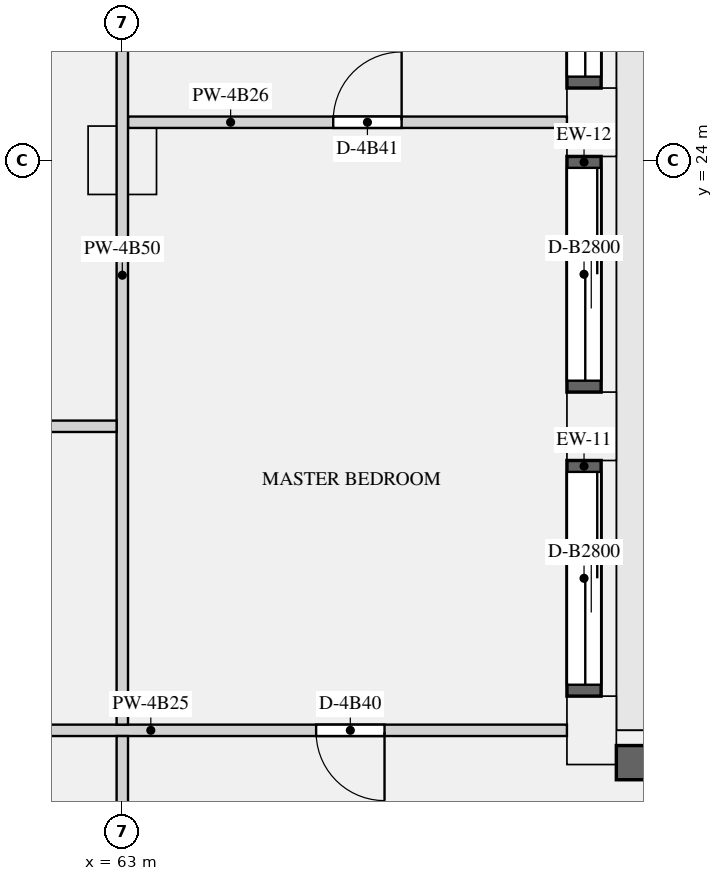
"""IFC4 building model, lengths in metres.
Left out: names, types, materials, properties, quantities, classifications, styles, units other than length and angle.
Written with IfcOpenShell. Run it as: python <this file> out.ifc"""

import sys

from ifc_helpers import new_model, si_unit, direction, frame, frame_2d, origin, origin_2d, place, context, subcontext, project, spatial, rectangle, extrude, element, fill, save


model = new_model("IFC4")
c1 = context("Model", 3, precision=1e-05, world=origin(), true_north=direction((0.0, 1.0)))
c2 = subcontext(c1, "Body", "Model", "MODEL_VIEW")
j1 = project(units=[si_unit("LENGTHUNIT", "METRE"), si_unit("PLANEANGLEUNIT", "RADIAN")], contexts=[c1])
p1 = place(None, origin())
s1 = spatial("IfcSite", under=j1, at=p1, CompositionType="ELEMENT")
p2 = place(p1, origin())
s2 = spatial("IfcBuilding", under=s1, at=p2, CompositionType="ELEMENT")
p3 = place(p2, frame((0.0, 0.0, 207.45)))
s3 = spatial("IfcBuildingStorey", under=s2, at=p3, CompositionType="ELEMENT", Elevation=207.45)
for number, where, z_axis, x_axis in (
    (1, (69.175, 16.5, 0.0), (0.0, 0.0, 1.0), (0.0, 1.0, 0.0)),
    (2, (69.175, 20.5, 0.0), (0.0, 0.0, 1.0), (0.0, 1.0, 0.0)),
    (3, (69.175, 24.5, 0.0), (0.0, 0.0, 1.0), (0.0, 1.0, 0.0)),
):
    element("IfcColumn", number, at=place(p3, frame(where, z_axis=z_axis, x_axis=x_axis)), inside=s3, PredefinedType="USERDEFINED", context=c2, shape_type="SweptSolid", body=[
        extrude(rectangle(XDim=0.9, YDim=0.65, at=origin_2d()), origin(), (0.0, 0.0, 1.0), 3.15),
    ])
p4 = place(p3, frame((63.0, 24.0, 0.0), z_axis=(0.0, 0.0, 1.0), x_axis=(1.0, 0.0, 0.0)))
e4 = element("IfcColumn", 4, at=p4, inside=s3, PredefinedType="COLUMN", context=c2, shape_type="SweptSolid", body=[
    extrude(rectangle(XDim=0.9, YDim=0.9, at=origin_2d()), origin(), (0.0, 0.0, 1.0), 3.15),
])
p5 = place(p3, frame((71.1, 16.075, 0.9), z_axis=(0.0, 0.0, 1.0), x_axis=(-1.0, 0.0, 0.0)))
e5 = element("IfcWall", 5, at=p5, inside=s3, PredefinedType="SOLIDWALL", context=c2, shape_type="SweptSolid", body=[
    extrude(rectangle(XDim=1.6, YDim=0.45, at=frame_2d((0.8, 0.0))), origin(), (0.0, 0.0, 1.0), 1.93),
])
p6 = place(p3, frame((69.075, 16.95, 0.0), z_axis=(0.0, 0.0, 1.0), x_axis=(0.0, 1.0, 0.0)))
e6 = element("IfcWall", 6, at=p6, inside=s3, PredefinedType="SOLIDWALL", context=c2, shape_type="SweptSolid", body=[
    extrude(rectangle(XDim=3.1, YDim=0.45, at=frame_2d((1.55, 0.0))), origin(), (0.0, 0.0, 1.0), 2.83),
])
p7 = place(p6, frame((0.15, 0.0, 0.0)))
e7 = element("IfcOpeningElement", 7, at=p7, cuts=e6, PredefinedType="OPENING", context=c2, shape_type="SweptSolid", body=[
    extrude(rectangle(XDim=2.8, YDim=2.3, at=frame_2d((1.4, 1.15))), frame((0.0, 0.235, 0.0), z_axis=(0.0, -1.0, 0.0), x_axis=(1.0, 0.0, 0.0)), (0.0, 0.0, 1.0), 0.47),
])
p8 = place(p3, frame((69.075, 20.95, 0.0), z_axis=(0.0, 0.0, 1.0), x_axis=(0.0, 1.0, 0.0)))
e8 = element("IfcWall", 8, at=p8, inside=s3, PredefinedType="SOLIDWALL", context=c2, shape_type="SweptSolid", body=[
    extrude(rectangle(XDim=3.1, YDim=0.45, at=frame_2d((1.55, 0.0))), origin(), (0.0, 0.0, 1.0), 2.83),
])
p9 = place(p8, frame((0.15, 0.0, 0.0)))
e9 = element("IfcOpeningElement", 9, at=p9, cuts=e8, PredefinedType="OPENING", context=c2, shape_type="SweptSolid", body=[
    extrude(rectangle(XDim=2.8, YDim=2.3, at=frame_2d((1.4, 1.15))), frame((0.0, 0.235, 0.0), z_axis=(0.0, -1.0, 0.0), x_axis=(1.0, 0.0, 0.0)), (0.0, 0.0, 1.0), 0.47),
])
p10 = place(p3, frame((69.075, 24.95, 0.0), z_axis=(0.0, 0.0, 1.0), x_axis=(0.0, 1.0, 0.0)))
e10 = element("IfcWall", 10, at=p10, inside=s3, PredefinedType="SOLIDWALL", context=c2, shape_type="SweptSolid", body=[
    extrude(rectangle(XDim=3.55, YDim=0.45, at=frame_2d((1.775, 0.0))), origin(), (0.0, 0.0, 1.0), 2.83),
])
p11 = place(p10, frame((0.15, 0.0, 0.0)))
e11 = element("IfcOpeningElement", 11, at=p11, cuts=e10, PredefinedType="OPENING", context=c2, shape_type="SweptSolid", body=[
    extrude(rectangle(XDim=3.25, YDim=2.3, at=frame_2d((1.625, 1.15))), frame((0.0, 0.235, 0.0), z_axis=(0.0, -1.0, 0.0), x_axis=(1.0, 0.0, 0.0)), (0.0, 0.0, 1.0), 0.47),
])
p12 = place(p3, frame((58.575, 20.5, 0.0), z_axis=(0.0, 0.0, 1.0), x_axis=(1.0, 0.0, 0.0)))
e12 = element("IfcWall", 12, at=p12, inside=s3, PredefinedType="PARTITIONING", context=c2, shape_type="SweptSolid", body=[
    extrude(rectangle(XDim=4.35, YDim=0.15, at=frame_2d((2.175, 0.0))), origin(), (0.0, 0.0, 1.0), 2.83),
])
p13 = place(p3, frame((54.1, 16.5, 0.0), z_axis=(0.0, 0.0, 1.0), x_axis=(1.0, 0.0, 0.0)))
e13 = element("IfcWall", 13, at=p13, inside=s3, PredefinedType="PARTITIONING", context=c2, shape_type="SweptSolid", body=[
    extrude(rectangle(XDim=14.75, YDim=0.15, at=frame_2d((7.375, 0.0))), origin(), (0.0, 0.0, 1.0), 2.83),
])
p14 = place(p13, frame((1.4, 0.0, 0.0)))
e14 = element("IfcOpeningElement", 14, at=p14, cuts=e13, PredefinedType="OPENING", context=c2, shape_type="SweptSolid", body=[
    extrude(rectangle(XDim=1.5, YDim=2.1, at=frame_2d((0.75, 1.05))), frame((0.0, 0.085, 0.0), z_axis=(0.0, -1.0, 0.0), x_axis=(1.0, 0.0, 0.0)), (0.0, 0.0, 1.0), 0.17),
])
p15 = place(p13, frame((6.2, 0.0, 0.0)))
e15 = element("IfcOpeningElement", 15, at=p15, cuts=e13, PredefinedType="OPENING", context=c2, shape_type="SweptSolid", body=[
    extrude(rectangle(XDim=0.9, YDim=2.1, at=frame_2d((0.45, 1.05))), frame((0.0, 0.085, 0.0), z_axis=(0.0, -1.0, 0.0), x_axis=(1.0, 0.0, 0.0)), (0.0, 0.0, 1.0), 0.17),
])
p16 = place(p13, frame((11.45, 0.0, 0.0)))
e16 = element("IfcOpeningElement", 16, at=p16, cuts=e13, PredefinedType="OPENING", context=c2, shape_type="SweptSolid", body=[
    extrude(rectangle(XDim=0.9, YDim=2.1, at=frame_2d((0.45, 1.05))), frame((0.0, 0.085, 0.0), z_axis=(0.0, -1.0, 0.0), x_axis=(1.0, 0.0, 0.0)), (0.0, 0.0, 1.0), 0.17),
])
p17 = place(p3, frame((63.075, 24.5, 0.0), z_axis=(0.0, 0.0, 1.0), x_axis=(1.0, 0.0, 0.0)))
e17 = element("IfcWall", 17, at=p17, inside=s3, PredefinedType="PARTITIONING", context=c2, shape_type="SweptSolid", body=[
    extrude(rectangle(XDim=5.775, YDim=0.15, at=frame_2d((2.888, 0.0))), origin(), (0.0, 0.0, 1.0), 2.83),
])
p18 = place(p17, frame((2.7, 0.0, 0.0)))
e18 = element("IfcOpeningElement", 18, at=p18, cuts=e17, PredefinedType="OPENING", context=c2, shape_type="SweptSolid", body=[
    extrude(rectangle(XDim=0.9, YDim=2.1, at=frame_2d((0.45, 1.05))), frame((0.0, 0.085, 0.0), z_axis=(0.0, -1.0, 0.0), x_axis=(1.0, 0.0, 0.0)), (0.0, 0.0, 1.0), 0.17),
])
p19 = place(p3, frame((63.0, 12.575, 0.0), z_axis=(0.0, 0.0, 1.0), x_axis=(0.0, 1.0, 0.0)))
e19 = element("IfcWall", 19, at=p19, inside=s3, PredefinedType="PARTITIONING", context=c2, shape_type="SweptSolid", body=[
    extrude(rectangle(XDim=3.85, YDim=0.15, at=frame_2d((1.925, 0.0))), origin(), (0.0, 0.0, 1.0), 2.83),
])
p20 = place(p19, frame((1.4, 0.0, 0.0)))
e20 = element("IfcOpeningElement", 20, at=p20, cuts=e19, PredefinedType="OPENING", context=c2, shape_type="SweptSolid", body=[
    extrude(rectangle(XDim=1.5, YDim=2.1, at=frame_2d((0.75, 1.05))), frame((0.0, 0.085, 0.0), z_axis=(0.0, -1.0, 0.0), x_axis=(1.0, 0.0, 0.0)), (0.0, 0.0, 1.0), 0.17),
])
p21 = place(p3, frame((63.0, 16.575, 0.0), z_axis=(0.0, 0.0, 1.0), x_axis=(0.0, 1.0, 0.0)))
e21 = element("IfcWall", 21, at=p21, inside=s3, PredefinedType="PARTITIONING", context=c2, shape_type="SweptSolid", body=[
    extrude(rectangle(XDim=11.825, YDim=0.15, at=frame_2d((5.913, 0.0))), origin(), (0.0, 0.0, 1.0), 2.83),
])
p22 = place(p7, origin())
e22 = element("IfcDoor", 22, at=p22, inside=s3, OperationType="SLIDING_TO_LEFT", PredefinedType="DOOR", context=c2, shape_type="SweptSolid", body=[
    extrude(rectangle(XDim=2.8, YDim=2.3, at=frame_2d((1.4, 1.15))), frame((0.0, -0.07, 0.0), z_axis=(0.0, -1.0, 0.0), x_axis=(1.0, 0.0, 0.0)), (0.0, 0.0, 1.0), 0.05),
])
fill(e7, e22)
p23 = place(p9, origin())
e23 = element("IfcDoor", 23, at=p23, inside=s3, OperationType="SLIDING_TO_LEFT", PredefinedType="DOOR", context=c2, shape_type="SweptSolid", body=[
    extrude(rectangle(XDim=2.8, YDim=2.3, at=frame_2d((1.4, 1.15))), frame((0.0, -0.07, 0.0), z_axis=(0.0, -1.0, 0.0), x_axis=(1.0, 0.0, 0.0)), (0.0, 0.0, 1.0), 0.05),
])
fill(e9, e23)
p24 = place(p11, origin())
e24 = element("IfcDoor", 24, at=p24, inside=s3, OperationType="SLIDING_TO_LEFT", PredefinedType="DOOR", context=c2, shape_type="SweptSolid", body=[
    extrude(rectangle(XDim=3.25, YDim=2.3, at=frame_2d((1.625, 1.15))), frame((0.0, -0.07, 0.0), z_axis=(0.0, -1.0, 0.0), x_axis=(1.0, 0.0, 0.0)), (0.0, 0.0, 1.0), 0.05),
])
fill(e11, e24)
p25 = place(p16, frame((0.9, 0.0, 0.0), z_axis=(0.0, 0.0, 1.0), x_axis=(-1.0, 0.0, 0.0)))
e25 = element("IfcDoor", 25, at=p25, inside=s3, OperationType="SINGLE_SWING_LEFT", PredefinedType="DOOR", context=c2, shape_type="SweptSolid", body=[
    extrude(rectangle(XDim=0.9, YDim=2.1, at=frame_2d((0.45, 1.05))), frame((0.0, 0.025, 0.0), z_axis=(0.0, -1.0, 0.0), x_axis=(1.0, 0.0, 0.0)), (0.0, 0.0, 1.0), 0.05),
])
fill(e16, e25)
p26 = place(p18, origin())
e26 = element("IfcDoor", 26, at=p26, inside=s3, OperationType="SINGLE_SWING_RIGHT", PredefinedType="DOOR", context=c2, shape_type="SweptSolid", body=[
    extrude(rectangle(XDim=0.9, YDim=2.1, at=frame_2d((0.45, 1.05))), frame((0.0, 0.025, 0.0), z_axis=(0.0, -1.0, 0.0), x_axis=(1.0, 0.0, 0.0)), (0.0, 0.0, 1.0), 0.05),
])
fill(e18, e26)
save(model, sys.argv[1])
